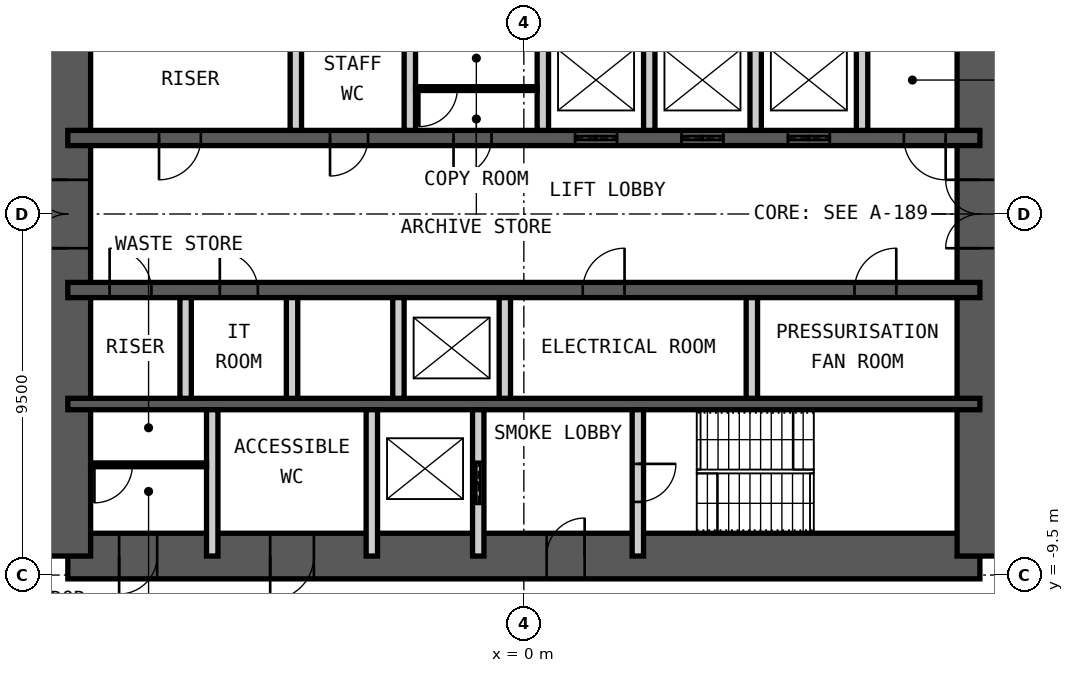
"""IFC4 building model, lengths in metres.
Left out: names, types, materials, properties, quantities, classifications, styles, units other than length and angle.
Written with IfcOpenShell. Run it as: python <this file> out.ifc"""

import sys

from ifc_helpers import new_model, si_unit, direction, frame, frame_2d, origin, place, context, subcontext, project, spatial, rectangle, extrude, element, fill, save


model = new_model("IFC4")
c1 = context("Model", 3, precision=1e-05, world=origin(), true_north=direction((0.0, 1.0)))
c2 = subcontext(c1, "Body", "Model", "MODEL_VIEW")
j1 = project(units=[si_unit("LENGTHUNIT", "METRE"), si_unit("PLANEANGLEUNIT", "RADIAN")], contexts=[c1])
p1 = place(None, origin())
s1 = spatial("IfcSite", under=j1, at=p1, CompositionType="ELEMENT")
p2 = place(p1, origin())
s2 = spatial("IfcBuilding", under=s1, at=p2, CompositionType="ELEMENT")
p3 = place(p2, frame((0.0, 0.0, 184.6)))
s3 = spatial("IfcBuildingStorey", under=s2, at=p3, CompositionType="ELEMENT", Elevation=184.6)
p4 = place(p3, frame((-12.0, -9.0, 0.0), z_axis=(0.0, 0.0, 1.0), x_axis=(1.0, 0.0, 0.0)))
e1 = element("IfcWall", 1, at=p4, inside=s3, PredefinedType="SHEAR", context=c2, shape_type="SweptSolid", body=[
    extrude(rectangle(XDim=24.0, YDim=1.2, at=frame_2d((12.0, 0.0))), origin(), (0.0, 0.0, 1.0), 4.2),
])
p5 = place(p4, frame((1.35, 0.0, 0.0)))
e2 = element("IfcOpeningElement", 2, at=p5, cuts=e1, PredefinedType="OPENING", context=c2, shape_type="SweptSolid", body=[
    extrude(rectangle(XDim=1.0, YDim=2.1, at=frame_2d((0.5, 1.05))), frame((0.0, 0.61, 0.0), z_axis=(0.0, -1.0, 0.0), x_axis=(1.0, 0.0, 0.0)), (0.0, 0.0, 1.0), 1.22),
])
p6 = place(p4, frame((5.325, 0.0, 0.0)))
e3 = element("IfcOpeningElement", 3, at=p6, cuts=e1, PredefinedType="OPENING", context=c2, shape_type="SweptSolid", body=[
    extrude(rectangle(XDim=1.15, YDim=2.1, at=frame_2d((0.575, 1.05))), frame((0.0, 0.61, 0.0), z_axis=(0.0, -1.0, 0.0), x_axis=(1.0, 0.0, 0.0)), (0.0, 0.0, 1.0), 1.22),
])
p7 = place(p4, frame((12.6, 0.0, 0.0)))
e4 = element("IfcOpeningElement", 4, at=p7, cuts=e1, PredefinedType="OPENING", context=c2, shape_type="SweptSolid", body=[
    extrude(rectangle(XDim=1.0, YDim=2.1, at=frame_2d((0.5, 1.05))), frame((0.0, 0.61, 0.0), z_axis=(0.0, -1.0, 0.0), x_axis=(1.0, 0.0, 0.0)), (0.0, 0.0, 1.0), 1.22),
])
p8 = place(p3, frame((12.0, -9.0, 0.0), z_axis=(0.0, 0.0, 1.0), x_axis=(0.0, 1.0, 0.0)))
e5 = element("IfcWall", 5, at=p8, inside=s3, PredefinedType="SHEAR", context=c2, shape_type="SweptSolid", body=[
    extrude(rectangle(XDim=18.0, YDim=1.2, at=frame_2d((9.0, 0.0))), origin(), (0.0, 0.0, 1.0), 4.2),
])
p9 = place(p8, frame((8.1, 0.0, 0.0)))
e6 = element("IfcOpeningElement", 6, at=p9, cuts=e5, PredefinedType="OPENING", context=c2, shape_type="SweptSolid", body=[
    extrude(rectangle(XDim=1.8, YDim=2.1, at=frame_2d((0.9, 1.05))), frame((0.0, 0.61, 0.0), z_axis=(0.0, -1.0, 0.0), x_axis=(1.0, 0.0, 0.0)), (0.0, 0.0, 1.0), 1.22),
])
p10 = place(p3, frame((-12.0, -9.0, 0.0), z_axis=(0.0, 0.0, 1.0), x_axis=(0.0, 1.0, 0.0)))
e7 = element("IfcWall", 7, at=p10, inside=s3, PredefinedType="SHEAR", context=c2, shape_type="SweptSolid", body=[
    extrude(rectangle(XDim=18.0, YDim=1.2, at=frame_2d((9.0, 0.0))), origin(), (0.0, 0.0, 1.0), 4.2),
])
p11 = place(p10, frame((8.1, 0.0, 0.0)))
e8 = element("IfcOpeningElement", 8, at=p11, cuts=e7, PredefinedType="OPENING", context=c2, shape_type="SweptSolid", body=[
    extrude(rectangle(XDim=1.8, YDim=2.1, at=frame_2d((0.9, 1.05))), frame((0.0, 0.61, 0.0), z_axis=(0.0, -1.0, 0.0), x_axis=(1.0, 0.0, 0.0)), (0.0, 0.0, 1.0), 1.22),
])
p12 = place(p3, frame((-12.0, 2.0, 0.0), z_axis=(0.0, 0.0, 1.0), x_axis=(1.0, 0.0, 0.0)))
e9 = element("IfcWall", 9, at=p12, inside=s3, PredefinedType="SHEAR", context=c2, shape_type="SweptSolid", body=[
    extrude(rectangle(XDim=24.0, YDim=0.4, at=frame_2d((12.0, 0.0))), origin(), (0.0, 0.0, 1.0), 4.2),
])
p13 = place(p12, frame((2.4, 0.0, 0.0)))
e10 = element("IfcOpeningElement", 10, at=p13, cuts=e9, PredefinedType="OPENING", context=c2, shape_type="SweptSolid", body=[
    extrude(rectangle(XDim=1.1, YDim=2.1, at=frame_2d((0.55, 1.05))), frame((0.0, 0.21, 0.0), z_axis=(0.0, -1.0, 0.0), x_axis=(1.0, 0.0, 0.0)), (0.0, 0.0, 1.0), 0.42),
])
p14 = place(p12, frame((22.0, 0.0, 0.0)))
e11 = element("IfcOpeningElement", 11, at=p14, cuts=e9, PredefinedType="OPENING", context=c2, shape_type="SweptSolid", body=[
    extrude(rectangle(XDim=1.1, YDim=2.1, at=frame_2d((0.55, 1.05))), frame((0.0, 0.21, 0.0), z_axis=(0.0, -1.0, 0.0), x_axis=(1.0, 0.0, 0.0)), (0.0, 0.0, 1.0), 0.42),
])
p15 = place(p12, frame((10.15, 0.0, 0.0)))
e12 = element("IfcOpeningElement", 12, at=p15, cuts=e9, PredefinedType="OPENING", context=c2, shape_type="SweptSolid", body=[
    extrude(rectangle(XDim=1.0, YDim=2.1, at=frame_2d((0.5, 1.05))), frame((0.0, 0.21, 0.0), z_axis=(0.0, -1.0, 0.0), x_axis=(1.0, 0.0, 0.0)), (0.0, 0.0, 1.0), 0.42),
])
p16 = place(p12, frame((6.9, 0.0, 0.0)))
e13 = element("IfcOpeningElement", 13, at=p16, cuts=e9, PredefinedType="OPENING", context=c2, shape_type="SweptSolid", body=[
    extrude(rectangle(XDim=1.0, YDim=2.1, at=frame_2d((0.5, 1.05))), frame((0.0, 0.21, 0.0), z_axis=(0.0, -1.0, 0.0), x_axis=(1.0, 0.0, 0.0)), (0.0, 0.0, 1.0), 0.42),
])
p17 = place(p12, frame((13.35, 0.0, 0.0)))
e14 = element("IfcOpeningElement", 14, at=p17, cuts=e9, PredefinedType="OPENING", context=c2, shape_type="SweptSolid", body=[
    extrude(rectangle(XDim=1.1, YDim=2.4, at=frame_2d((0.55, 1.2))), frame((0.0, 0.21, 0.0), z_axis=(0.0, -1.0, 0.0), x_axis=(1.0, 0.0, 0.0)), (0.0, 0.0, 1.0), 0.42),
])
p18 = place(p12, frame((16.15, 0.0, 0.0)))
e15 = element("IfcOpeningElement", 15, at=p18, cuts=e9, PredefinedType="OPENING", context=c2, shape_type="SweptSolid", body=[
    extrude(rectangle(XDim=1.1, YDim=2.4, at=frame_2d((0.55, 1.2))), frame((0.0, 0.21, 0.0), z_axis=(0.0, -1.0, 0.0), x_axis=(1.0, 0.0, 0.0)), (0.0, 0.0, 1.0), 0.42),
])
p19 = place(p12, frame((18.95, 0.0, 0.0)))
e16 = element("IfcOpeningElement", 16, at=p19, cuts=e9, PredefinedType="OPENING", context=c2, shape_type="SweptSolid", body=[
    extrude(rectangle(XDim=1.1, YDim=2.4, at=frame_2d((0.55, 1.2))), frame((0.0, 0.21, 0.0), z_axis=(0.0, -1.0, 0.0), x_axis=(1.0, 0.0, 0.0)), (0.0, 0.0, 1.0), 0.42),
])
p20 = place(p3, frame((-12.0, -2.0, 0.0), z_axis=(0.0, 0.0, 1.0), x_axis=(1.0, 0.0, 0.0)))
e17 = element("IfcWall", 17, at=p20, inside=s3, PredefinedType="SHEAR", context=c2, shape_type="SweptSolid", body=[
    extrude(rectangle(XDim=24.0, YDim=0.4, at=frame_2d((12.0, 0.0))), origin(), (0.0, 0.0, 1.0), 4.2),
])
p21 = place(p20, frame((1.1, 0.0, 0.0)))
e18 = element("IfcOpeningElement", 18, at=p21, cuts=e17, PredefinedType="OPENING", context=c2, shape_type="SweptSolid", body=[
    extrude(rectangle(XDim=1.1, YDim=2.1, at=frame_2d((0.55, 1.05))), frame((0.0, 0.21, 0.0), z_axis=(0.0, -1.0, 0.0), x_axis=(1.0, 0.0, 0.0)), (0.0, 0.0, 1.0), 0.42),
])
p22 = place(p20, frame((13.55, 0.0, 0.0)))
e19 = element("IfcOpeningElement", 19, at=p22, cuts=e17, PredefinedType="OPENING", context=c2, shape_type="SweptSolid", body=[
    extrude(rectangle(XDim=1.1, YDim=2.1, at=frame_2d((0.55, 1.05))), frame((0.0, 0.21, 0.0), z_axis=(0.0, -1.0, 0.0), x_axis=(1.0, 0.0, 0.0)), (0.0, 0.0, 1.0), 0.42),
])
p23 = place(p20, frame((20.7, 0.0, 0.0)))
e20 = element("IfcOpeningElement", 20, at=p23, cuts=e17, PredefinedType="OPENING", context=c2, shape_type="SweptSolid", body=[
    extrude(rectangle(XDim=1.1, YDim=2.1, at=frame_2d((0.55, 1.05))), frame((0.0, 0.21, 0.0), z_axis=(0.0, -1.0, 0.0), x_axis=(1.0, 0.0, 0.0)), (0.0, 0.0, 1.0), 0.42),
])
p24 = place(p20, frame((4.0, 0.0, 0.0)))
e21 = element("IfcOpeningElement", 21, at=p24, cuts=e17, PredefinedType="OPENING", context=c2, shape_type="SweptSolid", body=[
    extrude(rectangle(XDim=1.0, YDim=2.1, at=frame_2d((0.5, 1.05))), frame((0.0, 0.21, 0.0), z_axis=(0.0, -1.0, 0.0), x_axis=(1.0, 0.0, 0.0)), (0.0, 0.0, 1.0), 0.42),
])
p25 = place(p3, frame((-12.0, -5.0, 0.0), z_axis=(0.0, 0.0, 1.0), x_axis=(1.0, 0.0, 0.0)))
e22 = element("IfcWall", 22, at=p25, inside=s3, PredefinedType="SHEAR", context=c2, shape_type="SweptSolid", body=[
    extrude(rectangle(XDim=24.0, YDim=0.3, at=frame_2d((12.0, 0.0))), origin(), (0.0, 0.0, 1.0), 4.2),
])
for number, where, z_axis, x_axis in (
    (23, (-6.0, 2.2, 0.0), (0.0, 0.0, 1.0), (0.0, 1.0, 0.0)),
    (24, (-3.0, 2.2, 0.0), (0.0, 0.0, 1.0), (0.0, 1.0, 0.0)),
    (25, (0.5, 2.2, 0.0), (0.0, 0.0, 1.0), (0.0, 1.0, 0.0)),
    (26, (3.3, 2.2, 0.0), (0.0, 0.0, 1.0), (0.0, 1.0, 0.0)),
    (27, (6.1, 2.2, 0.0), (0.0, 0.0, 1.0), (0.0, 1.0, 0.0)),
    (28, (8.9, 2.2, 0.0), (0.0, 0.0, 1.0), (0.0, 1.0, 0.0)),
    (29, (-8.9, -4.85, 0.0), (0.0, 0.0, 1.0), (0.0, 1.0, 0.0)),
    (30, (-6.1, -4.85, 0.0), (0.0, 0.0, 1.0), (0.0, 1.0, 0.0)),
    (31, (-3.3, -4.85, 0.0), (0.0, 0.0, 1.0), (0.0, 1.0, 0.0)),
    (32, (-0.5, -4.85, 0.0), (0.0, 0.0, 1.0), (0.0, 1.0, 0.0)),
    (33, (6.0, -4.85, 0.0), (0.0, 0.0, 1.0), (0.0, 1.0, 0.0)),
):
    element("IfcWall", number, at=place(p3, frame(where, z_axis=z_axis, x_axis=x_axis)), inside=s3, PredefinedType="PARTITIONING", context=c2, shape_type="SweptSolid", body=[
        extrude(rectangle(XDim=2.65, YDim=0.3, at=frame_2d((1.325, 0.0))), origin(), (0.0, 0.0, 1.0), 3.98),
    ])
for number, where, z_axis, x_axis in (
    (34, (-8.2, -9.0, 0.0), (0.0, 0.0, 1.0), (0.0, 1.0, 0.0)),
    (35, (-4.0, -9.0, 0.0), (0.0, 0.0, 1.0), (0.0, 1.0, 0.0)),
):
    element("IfcWall", number, at=place(p3, frame(where, z_axis=z_axis, x_axis=x_axis)), inside=s3, PredefinedType="PARTITIONING", context=c2, shape_type="SweptSolid", body=[
        extrude(rectangle(XDim=3.85, YDim=0.3, at=frame_2d((1.925, 0.0))), origin(), (0.0, 0.0, 1.0), 3.98),
    ])
p26 = place(p3, frame((-1.2, -9.0, 0.0), z_axis=(0.0, 0.0, 1.0), x_axis=(0.0, 1.0, 0.0)))
e36 = element("IfcWall", 36, at=p26, inside=s3, PredefinedType="PARTITIONING", context=c2, shape_type="SweptSolid", body=[
    extrude(rectangle(XDim=3.85, YDim=0.3, at=frame_2d((1.925, 0.0))), origin(), (0.0, 0.0, 1.0), 3.98),
])
p27 = place(p26, frame((1.375, 0.0, 0.0)))
e37 = element("IfcOpeningElement", 37, at=p27, cuts=e36, PredefinedType="OPENING", context=c2, shape_type="SweptSolid", body=[
    extrude(rectangle(XDim=1.1, YDim=2.4, at=frame_2d((0.55, 1.2))), frame((0.0, 0.16, 0.0), z_axis=(0.0, -1.0, 0.0), x_axis=(1.0, 0.0, 0.0)), (0.0, 0.0, 1.0), 0.32),
])
p28 = place(p3, frame((3.0, -9.0, 0.0), z_axis=(0.0, 0.0, 1.0), x_axis=(0.0, 1.0, 0.0)))
e38 = element("IfcWall", 38, at=p28, inside=s3, PredefinedType="PARTITIONING", context=c2, shape_type="SweptSolid", body=[
    extrude(rectangle(XDim=3.85, YDim=0.3, at=frame_2d((1.925, 0.0))), origin(), (0.0, 0.0, 1.0), 3.98),
])
p29 = place(p28, frame((1.425, 0.0, 0.0)))
e39 = element("IfcOpeningElement", 39, at=p29, cuts=e38, PredefinedType="OPENING", context=c2, shape_type="SweptSolid", body=[
    extrude(rectangle(XDim=1.0, YDim=2.1, at=frame_2d((0.5, 1.05))), frame((0.0, 0.16, 0.0), z_axis=(0.0, -1.0, 0.0), x_axis=(1.0, 0.0, 0.0)), (0.0, 0.0, 1.0), 0.32),
])
p30 = place(p3, frame((-2.85, 3.3, 0.0), z_axis=(0.0, 0.0, 1.0), x_axis=(1.0, 0.0, 0.0)))
e40 = element("IfcWall", 40, at=p30, inside=s3, PredefinedType="PARTITIONING", context=c2, shape_type="SweptSolid", body=[
    extrude(rectangle(XDim=3.2, YDim=0.1, at=frame_2d((1.6, 0.0))), origin(), (0.0, 0.0, 1.0), 3.98),
])
p31 = place(p30, frame((0.1, 0.0, 0.0)))
e41 = element("IfcOpeningElement", 41, at=p31, cuts=e40, PredefinedType="OPENING", context=c2, shape_type="SweptSolid", body=[
    extrude(rectangle(XDim=1.0, YDim=2.4, at=frame_2d((0.5, 1.2))), frame((0.0, 0.06, 0.0), z_axis=(0.0, -1.0, 0.0), x_axis=(1.0, 0.0, 0.0)), (0.0, 0.0, 1.0), 0.12),
])
p32 = place(p3, frame((-11.4, -6.6, 0.0), z_axis=(0.0, 0.0, 1.0), x_axis=(1.0, 0.0, 0.0)))
e42 = element("IfcWall", 42, at=p32, inside=s3, PredefinedType="PARTITIONING", context=c2, shape_type="SweptSolid", body=[
    extrude(rectangle(XDim=3.05, YDim=0.1, at=frame_2d((1.525, 0.0))), origin(), (0.0, 0.0, 1.0), 3.98),
])
p33 = place(p32, frame((0.1, 0.0, 0.0)))
e43 = element("IfcOpeningElement", 43, at=p33, cuts=e42, PredefinedType="OPENING", context=c2, shape_type="SweptSolid", body=[
    extrude(rectangle(XDim=1.0, YDim=2.4, at=frame_2d((0.5, 1.2))), frame((0.0, 0.06, 0.0), z_axis=(0.0, -1.0, 0.0), x_axis=(1.0, 0.0, 0.0)), (0.0, 0.0, 1.0), 0.12),
])
p34 = place(p5, origin())
e44 = element("IfcDoor", 44, at=p34, inside=s3, OperationType="SINGLE_SWING_LEFT", PredefinedType="DOOR", context=c2, shape_type="SweptSolid", body=[
    extrude(rectangle(XDim=1.0, YDim=2.1, at=frame_2d((0.5, 1.05))), frame((0.0, 0.025, 0.0), z_axis=(0.0, -1.0, 0.0), x_axis=(1.0, 0.0, 0.0)), (0.0, 0.0, 1.0), 0.05),
])
fill(e2, e44)
p35 = place(p6, origin())
e45 = element("IfcDoor", 45, at=p35, inside=s3, OperationType="SINGLE_SWING_LEFT", PredefinedType="DOOR", context=c2, shape_type="SweptSolid", body=[
    extrude(rectangle(XDim=1.15, YDim=2.1, at=frame_2d((0.575, 1.05))), frame((0.0, 0.025, 0.0), z_axis=(0.0, -1.0, 0.0), x_axis=(1.0, 0.0, 0.0)), (0.0, 0.0, 1.0), 0.05),
])
fill(e3, e45)
p36 = place(p7, origin())
e46 = element("IfcDoor", 46, at=p36, inside=s3, OperationType="SINGLE_SWING_LEFT", PredefinedType="DOOR", context=c2, shape_type="SweptSolid", body=[
    extrude(rectangle(XDim=1.0, YDim=2.1, at=frame_2d((0.5, 1.05))), frame((0.0, 0.025, 0.0), z_axis=(0.0, -1.0, 0.0), x_axis=(1.0, 0.0, 0.0)), (0.0, 0.0, 1.0), 0.05),
])
fill(e4, e46)
p37 = place(p29, origin())
e47 = element("IfcDoor", 47, at=p37, inside=s3, OperationType="SINGLE_SWING_RIGHT", PredefinedType="DOOR", context=c2, shape_type="SweptSolid", body=[
    extrude(rectangle(XDim=1.0, YDim=2.1, at=frame_2d((0.5, 1.05))), frame((0.0, 0.025, 0.0), z_axis=(0.0, -1.0, 0.0), x_axis=(1.0, 0.0, 0.0)), (0.0, 0.0, 1.0), 0.05),
])
fill(e39, e47)
p38 = place(p13, origin())
e48 = element("IfcDoor", 48, at=p38, inside=s3, OperationType="SINGLE_SWING_LEFT", PredefinedType="DOOR", context=c2, shape_type="SweptSolid", body=[
    extrude(rectangle(XDim=1.1, YDim=2.1, at=frame_2d((0.55, 1.05))), frame((0.0, 0.025, 0.0), z_axis=(0.0, -1.0, 0.0), x_axis=(1.0, 0.0, 0.0)), (0.0, 0.0, 1.0), 0.05),
])
fill(e10, e48)
p39 = place(p21, origin())
e49 = element("IfcDoor", 49, at=p39, inside=s3, OperationType="SINGLE_SWING_RIGHT", PredefinedType="DOOR", context=c2, shape_type="SweptSolid", body=[
    extrude(rectangle(XDim=1.1, YDim=2.1, at=frame_2d((0.55, 1.05))), frame((0.0, 0.025, 0.0), z_axis=(0.0, -1.0, 0.0), x_axis=(1.0, 0.0, 0.0)), (0.0, 0.0, 1.0), 0.05),
])
fill(e18, e49)
p40 = place(p14, origin())
e50 = element("IfcDoor", 50, at=p40, inside=s3, OperationType="SINGLE_SWING_RIGHT", PredefinedType="DOOR", context=c2, shape_type="SweptSolid", body=[
    extrude(rectangle(XDim=1.1, YDim=2.1, at=frame_2d((0.55, 1.05))), frame((0.0, 0.025, 0.0), z_axis=(0.0, -1.0, 0.0), x_axis=(1.0, 0.0, 0.0)), (0.0, 0.0, 1.0), 0.05),
])
fill(e11, e50)
p41 = place(p15, origin())
e51 = element("IfcDoor", 51, at=p41, inside=s3, OperationType="SINGLE_SWING_LEFT", PredefinedType="DOOR", context=c2, shape_type="SweptSolid", body=[
    extrude(rectangle(XDim=1.0, YDim=2.1, at=frame_2d((0.5, 1.05))), frame((0.0, 0.025, 0.0), z_axis=(0.0, -1.0, 0.0), x_axis=(1.0, 0.0, 0.0)), (0.0, 0.0, 1.0), 0.05),
])
fill(e12, e51)
p42 = place(p22, origin())
e52 = element("IfcDoor", 52, at=p42, inside=s3, OperationType="SINGLE_SWING_LEFT", PredefinedType="DOOR", context=c2, shape_type="SweptSolid", body=[
    extrude(rectangle(XDim=1.1, YDim=2.1, at=frame_2d((0.55, 1.05))), frame((0.0, 0.025, 0.0), z_axis=(0.0, -1.0, 0.0), x_axis=(1.0, 0.0, 0.0)), (0.0, 0.0, 1.0), 0.05),
])
fill(e19, e52)
p43 = place(p23, origin())
e53 = element("IfcDoor", 53, at=p43, inside=s3, OperationType="SINGLE_SWING_LEFT", PredefinedType="DOOR", context=c2, shape_type="SweptSolid", body=[
    extrude(rectangle(XDim=1.1, YDim=2.1, at=frame_2d((0.55, 1.05))), frame((0.0, 0.025, 0.0), z_axis=(0.0, -1.0, 0.0), x_axis=(1.0, 0.0, 0.0)), (0.0, 0.0, 1.0), 0.05),
])
fill(e20, e53)
p44 = place(p9, origin())
e54 = element("IfcDoor", 54, at=p44, inside=s3, OperationType="DOUBLE_DOOR_DOUBLE_SWING", PredefinedType="DOOR", context=c2, shape_type="SweptSolid", body=[
    extrude(rectangle(XDim=1.8, YDim=2.1, at=frame_2d((0.9, 1.05))), frame((0.0, 0.025, 0.0), z_axis=(0.0, -1.0, 0.0), x_axis=(1.0, 0.0, 0.0)), (0.0, 0.0, 1.0), 0.05),
])
fill(e6, e54)
p45 = place(p11, origin())
e55 = element("IfcDoor", 55, at=p45, inside=s3, OperationType="DOUBLE_DOOR_DOUBLE_SWING", PredefinedType="DOOR", context=c2, shape_type="SweptSolid", body=[
    extrude(rectangle(XDim=1.8, YDim=2.1, at=frame_2d((0.9, 1.05))), frame((0.0, 0.025, 0.0), z_axis=(0.0, -1.0, 0.0), x_axis=(1.0, 0.0, 0.0)), (0.0, 0.0, 1.0), 0.05),
])
fill(e8, e55)
p46 = place(p27, origin())
e56 = element("IfcDoor", 56, at=p46, inside=s3, OperationType="DOUBLE_DOOR_SLIDING", PredefinedType="DOOR", context=c2, shape_type="SweptSolid", body=[
    extrude(rectangle(XDim=1.1, YDim=2.4, at=frame_2d((0.55, 1.2))), frame((0.0, 0.025, 0.0), z_axis=(0.0, -1.0, 0.0), x_axis=(1.0, 0.0, 0.0)), (0.0, 0.0, 1.0), 0.05),
])
fill(e37, e56)
p47 = place(p16, origin())
e57 = element("IfcDoor", 57, at=p47, inside=s3, OperationType="SINGLE_SWING_LEFT", PredefinedType="DOOR", context=c2, shape_type="SweptSolid", body=[
    extrude(rectangle(XDim=1.0, YDim=2.1, at=frame_2d((0.5, 1.05))), frame((0.0, 0.025, 0.0), z_axis=(0.0, -1.0, 0.0), x_axis=(1.0, 0.0, 0.0)), (0.0, 0.0, 1.0), 0.05),
])
fill(e13, e57)
p48 = place(p17, origin())
e58 = element("IfcDoor", 58, at=p48, inside=s3, OperationType="DOUBLE_DOOR_SLIDING", PredefinedType="DOOR", context=c2, shape_type="SweptSolid", body=[
    extrude(rectangle(XDim=1.1, YDim=2.4, at=frame_2d((0.55, 1.2))), frame((0.0, 0.025, 0.0), z_axis=(0.0, -1.0, 0.0), x_axis=(1.0, 0.0, 0.0)), (0.0, 0.0, 1.0), 0.05),
])
fill(e14, e58)
p49 = place(p18, origin())
e59 = element("IfcDoor", 59, at=p49, inside=s3, OperationType="DOUBLE_DOOR_SLIDING", PredefinedType="DOOR", context=c2, shape_type="SweptSolid", body=[
    extrude(rectangle(XDim=1.1, YDim=2.4, at=frame_2d((0.55, 1.2))), frame((0.0, 0.025, 0.0), z_axis=(0.0, -1.0, 0.0), x_axis=(1.0, 0.0, 0.0)), (0.0, 0.0, 1.0), 0.05),
])
fill(e15, e59)
p50 = place(p19, origin())
e60 = element("IfcDoor", 60, at=p50, inside=s3, OperationType="DOUBLE_DOOR_SLIDING", PredefinedType="DOOR", context=c2, shape_type="SweptSolid", body=[
    extrude(rectangle(XDim=1.1, YDim=2.4, at=frame_2d((0.55, 1.2))), frame((0.0, 0.025, 0.0), z_axis=(0.0, -1.0, 0.0), x_axis=(1.0, 0.0, 0.0)), (0.0, 0.0, 1.0), 0.05),
])
fill(e16, e60)
p51 = place(p24, origin())
e61 = element("IfcDoor", 61, at=p51, inside=s3, OperationType="SINGLE_SWING_RIGHT", PredefinedType="DOOR", context=c2, shape_type="SweptSolid", body=[
    extrude(rectangle(XDim=1.0, YDim=2.1, at=frame_2d((0.5, 1.05))), frame((0.0, 0.025, 0.0), z_axis=(0.0, -1.0, 0.0), x_axis=(1.0, 0.0, 0.0)), (0.0, 0.0, 1.0), 0.05),
])
fill(e21, e61)
p52 = place(p31, origin())
e62 = element("IfcDoor", 62, at=p52, inside=s3, OperationType="SINGLE_SWING_LEFT", PredefinedType="DOOR", context=c2, shape_type="SweptSolid", body=[
    extrude(rectangle(XDim=1.0, YDim=2.4, at=frame_2d((0.5, 1.2))), frame((0.0, 0.025, 0.0), z_axis=(0.0, -1.0, 0.0), x_axis=(1.0, 0.0, 0.0)), (0.0, 0.0, 1.0), 0.05),
])
fill(e41, e62)
p53 = place(p33, origin())
e63 = element("IfcDoor", 63, at=p53, inside=s3, OperationType="SINGLE_SWING_LEFT", PredefinedType="DOOR", context=c2, shape_type="SweptSolid", body=[
    extrude(rectangle(XDim=1.0, YDim=2.4, at=frame_2d((0.5, 1.2))), frame((0.0, 0.025, 0.0), z_axis=(0.0, -1.0, 0.0), x_axis=(1.0, 0.0, 0.0)), (0.0, 0.0, 1.0), 0.05),
])
fill(e43, e63)
save(model, sys.argv[1])
